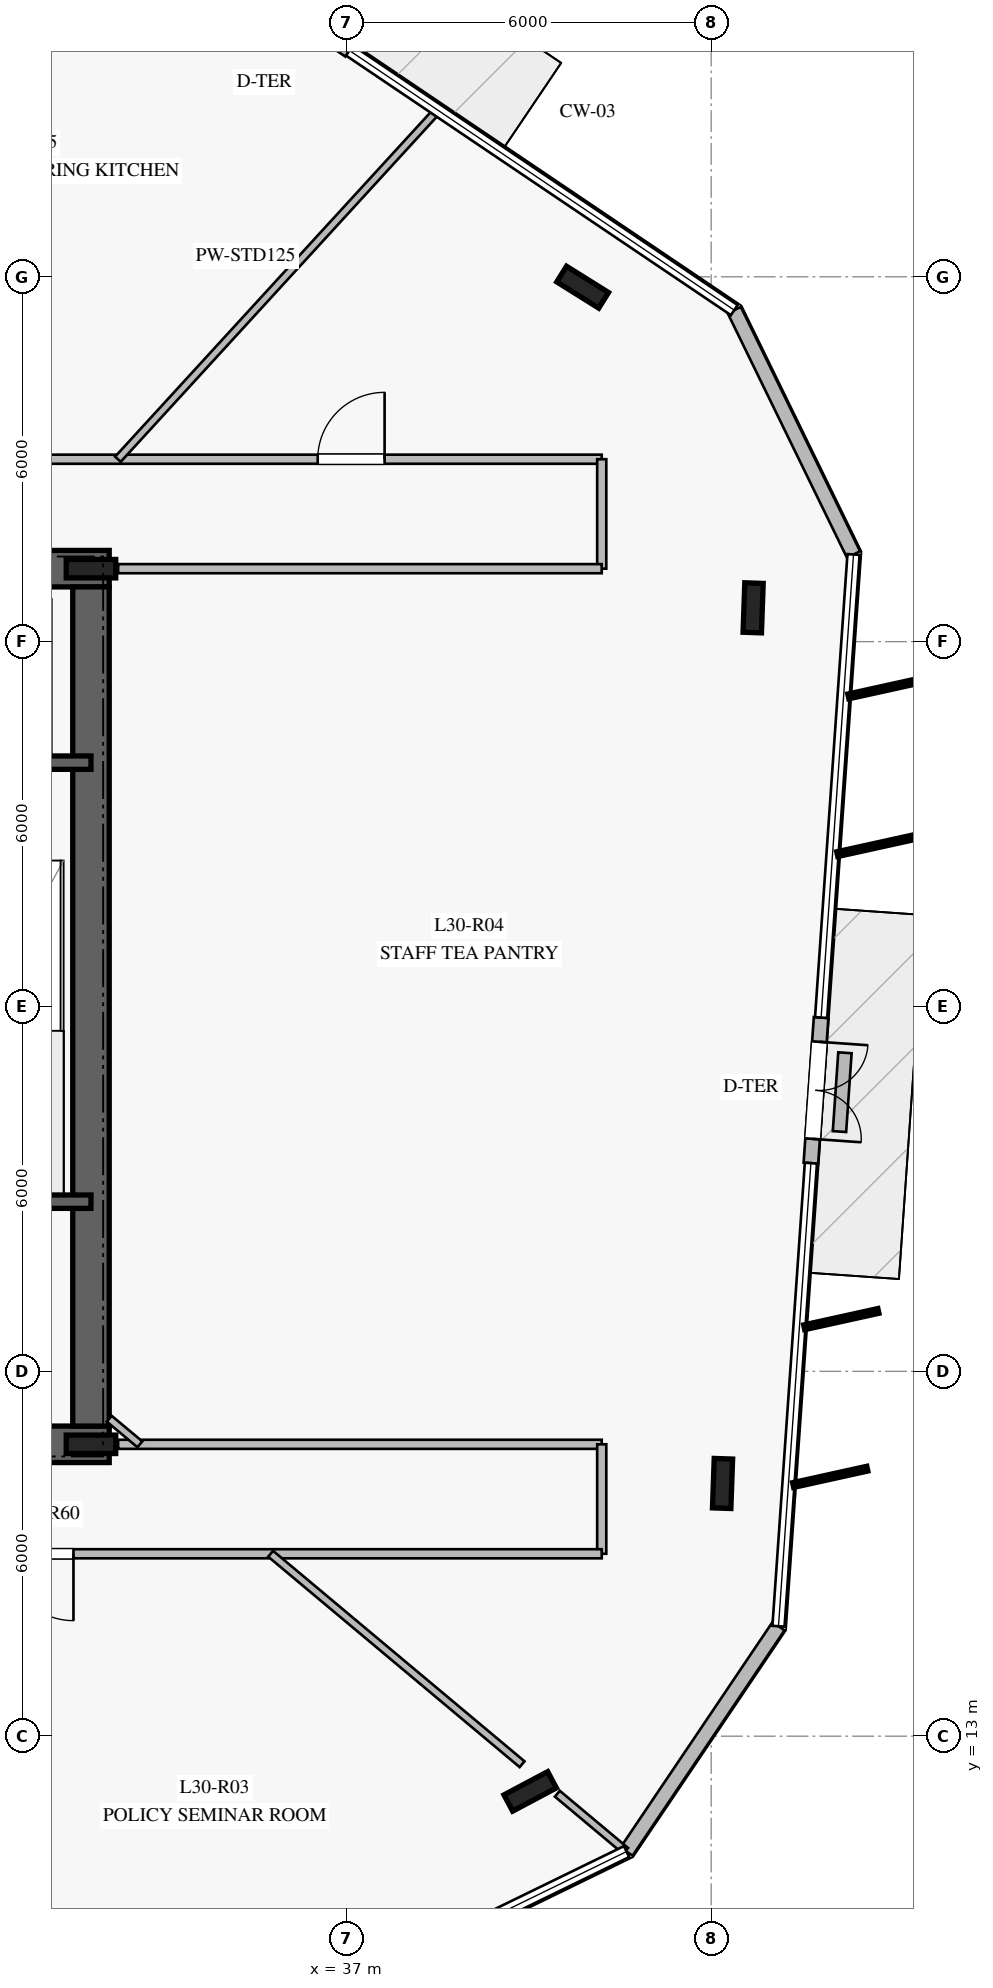
"""IFC4 building model, lengths in metres.
Left out: names, types, materials, properties, quantities, classifications, styles, units other than length and angle.
Written with IfcOpenShell. Run it as: python <this file> out.ifc"""

import sys

from ifc_helpers import new_model, si_unit, direction, frame, frame_2d, origin, origin_2d, place, context, subcontext, project, spatial, rectangle, i_section, extrude, element, fill, save


model = new_model("IFC4")
c1 = context("Model", 3, precision=1e-05, world=origin(), true_north=direction((0.0, 1.0)))
c2 = subcontext(c1, "Body", "Model", "MODEL_VIEW")
j1 = project(units=[si_unit("LENGTHUNIT", "METRE"), si_unit("PLANEANGLEUNIT", "RADIAN")], contexts=[c1])
p1 = place(None, origin())
s1 = spatial("IfcSite", under=j1, at=p1, CompositionType="ELEMENT")
p2 = place(p1, origin())
s2 = spatial("IfcBuilding", under=s1, at=p2, CompositionType="ELEMENT")
p3 = place(p2, frame((0.0, 0.0, 126.4)))
s3 = spatial("IfcBuildingStorey", under=s2, at=p3, CompositionType="ELEMENT", Elevation=126.4)
p4 = place(p3, frame((16.9, 17.8, 0.0), z_axis=(0.0, 0.0, 1.0), x_axis=(1.0, 0.0, 0.0)))
e1 = element("IfcWall", 1, at=p4, inside=s3, PredefinedType="SHEAR", context=c2, shape_type="SweptSolid", body=[
    extrude(rectangle(XDim=16.2, YDim=0.6, at=frame_2d((8.1, 0.0))), origin(), (0.0, 0.0, 1.0), 3.76),
])
p5 = place(p4, frame((5.05, 0.0, 0.0)))
e2 = element("IfcOpeningElement", 2, at=p5, cuts=e1, PredefinedType="OPENING", context=c2, shape_type="SweptSolid", body=[
    extrude(rectangle(XDim=1.2, YDim=2.25, at=frame_2d((0.6, 1.125))), frame((0.0, 0.31, 0.0), z_axis=(0.0, -1.0, 0.0), x_axis=(1.0, 0.0, 0.0)), (0.0, 0.0, 1.0), 0.62),
])
p6 = place(p4, frame((14.0, 0.0, 0.0)))
e3 = element("IfcOpeningElement", 3, at=p6, cuts=e1, PredefinedType="OPENING", context=c2, shape_type="SweptSolid", body=[
    extrude(rectangle(XDim=0.9, YDim=2.1, at=frame_2d((0.45, 1.05))), frame((0.0, 0.31, 0.0), z_axis=(0.0, -1.0, 0.0), x_axis=(1.0, 0.0, 0.0)), (0.0, 0.0, 1.0), 0.62),
])
p7 = place(p4, frame((9.25, 0.0, 0.0)))
e4 = element("IfcOpeningElement", 4, at=p7, cuts=e1, PredefinedType="OPENING", context=c2, shape_type="SweptSolid", body=[
    extrude(rectangle(XDim=1.1, YDim=2.2, at=frame_2d((0.55, 1.1))), frame((0.0, 0.31, 0.0), z_axis=(0.0, -1.0, 0.0), x_axis=(1.0, 0.0, 0.0)), (0.0, 0.0, 1.0), 0.62),
])
p8 = place(p3, frame((33.1, 32.2, 0.0), z_axis=(0.0, 0.0, 1.0), x_axis=(-1.0, 0.0, 0.0)))
e5 = element("IfcWall", 5, at=p8, inside=s3, PredefinedType="SHEAR", context=c2, shape_type="SweptSolid", body=[
    extrude(rectangle(XDim=16.2, YDim=0.6, at=frame_2d((8.1, 0.0))), origin(), (0.0, 0.0, 1.0), 3.76),
])
p9 = place(p8, frame((5.05, 0.0, 0.0)))
e6 = element("IfcOpeningElement", 6, at=p9, cuts=e5, PredefinedType="OPENING", context=c2, shape_type="SweptSolid", body=[
    extrude(rectangle(XDim=1.2, YDim=2.25, at=frame_2d((0.6, 1.125))), frame((0.0, 0.31, 0.0), z_axis=(0.0, -1.0, 0.0), x_axis=(1.0, 0.0, 0.0)), (0.0, 0.0, 1.0), 0.62),
])
p10 = place(p8, frame((11.85, 0.0, 0.0)))
e7 = element("IfcOpeningElement", 7, at=p10, cuts=e5, PredefinedType="OPENING", context=c2, shape_type="SweptSolid", body=[
    extrude(rectangle(XDim=1.1, YDim=2.2, at=frame_2d((0.55, 1.1))), frame((0.0, 0.31, 0.0), z_axis=(0.0, -1.0, 0.0), x_axis=(1.0, 0.0, 0.0)), (0.0, 0.0, 1.0), 0.62),
])
p11 = place(p8, frame((9.875, 0.0, 0.0)))
e8 = element("IfcOpeningElement", 8, at=p11, cuts=e5, PredefinedType="OPENING", context=c2, shape_type="SweptSolid", body=[
    extrude(rectangle(XDim=1.1, YDim=2.2, at=frame_2d((0.55, 1.1))), frame((0.0, 0.31, 0.0), z_axis=(0.0, -1.0, 0.0), x_axis=(1.0, 0.0, 0.0)), (0.0, 0.0, 1.0), 0.62),
])
p12 = place(p8, frame((7.9, 0.0, 0.0)))
e9 = element("IfcOpeningElement", 9, at=p12, cuts=e5, PredefinedType="OPENING", context=c2, shape_type="SweptSolid", body=[
    extrude(rectangle(XDim=1.1, YDim=2.2, at=frame_2d((0.55, 1.1))), frame((0.0, 0.31, 0.0), z_axis=(0.0, -1.0, 0.0), x_axis=(1.0, 0.0, 0.0)), (0.0, 0.0, 1.0), 0.62),
])
p13 = place(p3, frame((32.8, 18.1, 0.0), z_axis=(0.0, 0.0, 1.0), x_axis=(0.0, 1.0, 0.0)))
e10 = element("IfcWall", 10, at=p13, inside=s3, PredefinedType="SHEAR", context=c2, shape_type="SweptSolid", body=[
    extrude(rectangle(XDim=13.8, YDim=0.6, at=frame_2d((6.9, 0.0))), origin(), (0.0, 0.0, 1.0), 3.76),
])
for number, where, z_axis, x_axis in (
    (11, (32.8, 17.8, 0.0), (0.0, 0.0, 1.0), (1.0, 0.0, 0.0)),
    (12, (32.8, 32.2, 0.0), (0.0, 0.0, 1.0), (1.0, 0.0, 0.0)),
):
    element("IfcColumn", number, at=place(p3, frame(where, z_axis=z_axis, x_axis=x_axis)), inside=s3, PredefinedType="COLUMN", context=c2, shape_type="SweptSolid", body=[
        extrude(i_section(OverallWidth=0.303, OverallDepth=0.814, WebThickness=0.021, FlangeThickness=0.04, at=origin_2d()), origin(), (0.0, 0.0, 1.0), 4.0),
    ])
for number, where, z_axis, x_axis in (
    (13, (29.08, 21.79, 0.0), (0.0, 0.0, 1.0), (1.0, 0.0, 0.0)),
    (14, (29.08, 29.01, 0.0), (0.0, 0.0, 1.0), (1.0, 0.0, 0.0)),
):
    element("IfcWall", number, at=place(p3, frame(where, z_axis=z_axis, x_axis=x_axis)), inside=s3, PredefinedType="SOLIDWALL", context=c2, shape_type="SweptSolid", body=[
        extrude(rectangle(XDim=3.72, YDim=0.22, at=frame_2d((1.86, 0.0))), origin(), (0.0, 0.0, 1.0), 3.76),
    ])
for number, where, z_axis, x_axis in (
    (15, (40.886, 36.829, 0.0), (0.0, 0.0, 1.0), (-0.848, 0.53, 0.0)),
    (16, (40.023, 12.092, 0.0), (0.0, 0.0, 1.0), (0.883, 0.469, 0.0)),
    (17, (43.187, 17.156, 0.0), (0.0, 0.0, 1.0), (0.035, 0.999, 0.0)),
    (18, (43.69, 31.556, 0.0), (0.0, 0.0, 1.0), (0.035, 0.999, 0.0)),
):
    element("IfcColumn", number, at=place(p3, frame(where, z_axis=z_axis, x_axis=x_axis)), inside=s3, PredefinedType="COLUMN", context=c2, shape_type="SweptSolid", body=[
        extrude(i_section(OverallWidth=0.303, OverallDepth=0.814, WebThickness=0.021, FlangeThickness=0.04, at=origin_2d()), origin(), (0.0, 0.0, 1.0), 4.0),
    ])
p14 = place(p3, frame((37.051, 40.721, 0.0), z_axis=(0.0, 0.0, 1.0), x_axis=(-0.828953641959, 0.559317315558, 0.0)))
e19 = element("IfcWall", 19, at=p14, inside=s3, PredefinedType="STANDARD", context=c2, shape_type="SweptSolid", body=[
    extrude(rectangle(XDim=2.399, YDim=0.24, at=frame_2d((1.2, 0.0))), origin(), (0.0, 0.0, 1.0), 3.76),
])
p15 = place(p14, frame((0.4, 0.0, 0.0)))
e20 = element("IfcOpeningElement", 20, at=p15, cuts=e19, PredefinedType="OPENING", context=c2, shape_type="SweptSolid", body=[
    extrude(rectangle(XDim=1.6, YDim=2.25, at=frame_2d((0.8, 1.125))), frame((0.0, 0.13, 0.0), z_axis=(0.0, -1.0, 0.0), x_axis=(1.0, 0.0, 0.0)), (0.0, 0.0, 1.0), 0.26),
])
p16 = place(p3, frame((41.608, 11.102, 0.0), z_axis=(0.0, 0.0, 1.0), x_axis=(0.559078804203, 0.82911452206, 0.0)))
e21 = element("IfcWall", 21, at=p16, inside=s3, PredefinedType="STANDARD", context=c2, shape_type="SweptSolid", body=[
    extrude(rectangle(XDim=4.47, YDim=0.24, at=frame_2d((2.235, 0.0))), origin(), (0.0, 0.0, 1.0), 3.76),
])
p17 = place(p3, frame((44.64, 22.424, 0.0), z_axis=(0.0, 0.0, 1.0), x_axis=(0.070090302694, 0.997540650534, 0.0)))
e22 = element("IfcWall", 22, at=p17, inside=s3, PredefinedType="STANDARD", context=c2, shape_type="SweptSolid", body=[
    extrude(rectangle(XDim=2.4, YDim=0.24, at=frame_2d((1.2, 0.0))), origin(), (0.0, 0.0, 1.0), 3.76),
])
p18 = place(p17, frame((0.4, 0.0, 0.0)))
e23 = element("IfcOpeningElement", 23, at=p18, cuts=e22, PredefinedType="OPENING", context=c2, shape_type="SweptSolid", body=[
    extrude(rectangle(XDim=1.6, YDim=2.25, at=frame_2d((0.8, 1.125))), frame((0.0, 0.13, 0.0), z_axis=(0.0, -1.0, 0.0), x_axis=(1.0, 0.0, 0.0)), (0.0, 0.0, 1.0), 0.26),
])
p19 = place(p3, frame((45.341, 32.433, 0.0), z_axis=(0.0, 0.0, 1.0), x_axis=(-0.438566687479, 0.898698648399, 0.0)))
e24 = element("IfcWall", 24, at=p19, inside=s3, PredefinedType="STANDARD", context=c2, shape_type="SweptSolid", body=[
    extrude(rectangle(XDim=4.472, YDim=0.24, at=frame_2d((2.236, 0.0))), origin(), (0.0, 0.0, 1.0), 3.76),
])
p20 = place(p3, frame((45.11, 22.943, 0.0), z_axis=(0.0, 0.0, 1.0), x_axis=(0.069163294949, 0.997605352147, 0.0)))
e25 = element("IfcWall", 25, at=p20, inside=s3, PredefinedType="USERDEFINED", context=c2, shape_type="SweptSolid", body=[
    extrude(rectangle(XDim=1.299, YDim=0.22, at=frame_2d((0.649, 0.0))), origin(), (0.0, 0.0, 1.0), 0.4),
])
p21 = place(p3, frame((25.95, 34.0, 0.0), z_axis=(0.0, 0.0, 1.0), x_axis=(1.0, 0.0, 0.0)))
e26 = element("IfcWall", 26, at=p21, inside=s3, PredefinedType="PARTITIONING", context=c2, shape_type="SweptSolid", body=[
    extrude(rectangle(XDim=15.25, YDim=0.15, at=frame_2d((7.625, 0.0))), origin(), (0.0, 0.0, 1.0), 3.21),
])
p22 = place(p21, frame((10.579, 0.0, 0.0)))
e27 = element("IfcOpeningElement", 27, at=p22, cuts=e26, PredefinedType="OPENING", context=c2, shape_type="SweptSolid", body=[
    extrude(rectangle(XDim=1.1, YDim=2.2, at=frame_2d((0.55, 1.1))), frame((0.0, 0.085, 0.0), z_axis=(0.0, -1.0, 0.0), x_axis=(1.0, 0.0, 0.0)), (0.0, 0.0, 1.0), 0.17),
])
p23 = place(p3, frame((41.2, 34.0, 0.0), z_axis=(0.0, 0.0, 1.0), x_axis=(0.0, -1.0, 0.0)))
e28 = element("IfcWall", 28, at=p23, inside=s3, PredefinedType="PARTITIONING", context=c2, shape_type="SweptSolid", body=[
    extrude(rectangle(XDim=1.8, YDim=0.15, at=frame_2d((0.9, 0.0))), origin(), (0.0, 0.0, 1.0), 3.76),
])
for number, where, z_axis, x_axis in (
    (29, (41.2, 32.2, 0.0), (0.0, 0.0, 1.0), (-1.0, 0.0, 0.0)),
    (30, (33.247, 17.8, 0.0), (0.0, 0.0, 1.0), (1.0, 0.0, 0.0)),
):
    element("IfcWall", number, at=place(p3, frame(where, z_axis=z_axis, x_axis=x_axis)), inside=s3, PredefinedType="PARTITIONING", context=c2, shape_type="SweptSolid", body=[
        extrude(rectangle(XDim=7.953, YDim=0.15, at=frame_2d((3.977, 0.0))), origin(), (0.0, 0.0, 1.0), 3.21),
    ])
p24 = place(p3, frame((41.2, 17.8, 0.0), z_axis=(0.0, 0.0, 1.0), x_axis=(0.0, -1.0, 0.0)))
e31 = element("IfcWall", 31, at=p24, inside=s3, PredefinedType="PARTITIONING", context=c2, shape_type="SweptSolid", body=[
    extrude(rectangle(XDim=1.8, YDim=0.15, at=frame_2d((0.9, 0.0))), origin(), (0.0, 0.0, 1.0), 3.21),
])
p25 = place(p3, frame((41.2, 16.0, 0.0), z_axis=(0.0, 0.0, 1.0), x_axis=(-1.0, 0.0, 0.0)))
e32 = element("IfcWall", 32, at=p25, inside=s3, PredefinedType="PARTITIONING", context=c2, shape_type="SweptSolid", body=[
    extrude(rectangle(XDim=15.25, YDim=0.15, at=frame_2d((7.625, 0.0))), origin(), (0.0, 0.0, 1.0), 3.21),
])
p26 = place(p25, frame((13.648, 0.0, 0.0)))
e33 = element("IfcOpeningElement", 33, at=p26, cuts=e32, PredefinedType="OPENING", context=c2, shape_type="SweptSolid", body=[
    extrude(rectangle(XDim=1.1, YDim=2.2, at=frame_2d((0.55, 1.1))), frame((0.0, 0.085, 0.0), z_axis=(0.0, -1.0, 0.0), x_axis=(1.0, 0.0, 0.0)), (0.0, 0.0, 1.0), 0.17),
])
p27 = place(p25, frame((8.688, 0.0, 0.0)))
e34 = element("IfcOpeningElement", 34, at=p27, cuts=e32, PredefinedType="OPENING", context=c2, shape_type="SweptSolid", body=[
    extrude(rectangle(XDim=1.1, YDim=2.2, at=frame_2d((0.55, 1.1))), frame((0.0, 0.085, 0.0), z_axis=(0.0, -1.0, 0.0), x_axis=(1.0, 0.0, 0.0)), (0.0, 0.0, 1.0), 0.17),
])
p28 = place(p3, frame((33.243, 34.0, 0.0), z_axis=(0.0, 0.0, 1.0), x_axis=(0.675476997876, 0.737381058436, 0.0)))
e35 = element("IfcWall", 35, at=p28, inside=s3, PredefinedType="PARTITIONING", context=c2, shape_type="SweptSolid", body=[
    extrude(rectangle(XDim=7.769, YDim=0.125, at=frame_2d((3.885, 0.0))), origin(), (0.0, 0.0, 1.0), 3.05),
])
p29 = place(p3, frame((33.1, 18.221, 0.0), z_axis=(0.0, 0.0, 1.0), x_axis=(0.76748927859, -0.641061781148, 0.0)))
e36 = element("IfcWall", 36, at=p29, inside=s3, PredefinedType="PARTITIONING", context=c2, shape_type="SweptSolid", body=[
    extrude(rectangle(XDim=0.656, YDim=0.125, at=frame_2d((0.328, 0.0))), origin(), (0.0, 0.0, 1.0), 3.21),
])
p30 = place(p3, frame((35.755, 16.0, 0.0), z_axis=(0.0, 0.0, 1.0), x_axis=(0.766842661683, -0.641835128536, 0.0)))
e37 = element("IfcWall", 37, at=p30, inside=s3, PredefinedType="PARTITIONING", context=c2, shape_type="SweptSolid", body=[
    extrude(rectangle(XDim=5.392, YDim=0.125, at=frame_2d((2.696, 0.0))), origin(), (0.0, 0.0, 1.0), 3.36),
])
p31 = place(p3, frame((40.47, 12.054, 0.0), z_axis=(0.0, 0.0, 1.0), x_axis=(0.766853077224, -0.641822684199, 0.0)))
e38 = element("IfcWall", 38, at=p31, inside=s3, PredefinedType="PARTITIONING", context=c2, shape_type="SweptSolid", body=[
    extrude(rectangle(XDim=1.465, YDim=0.125, at=frame_2d((0.732, 0.0))), origin(), (0.0, 0.0, 1.0), 3.76),
])
p32 = place(p18, frame((1.6, 0.0, 0.0), z_axis=(0.0, 0.0, 1.0), x_axis=(-1.0, 0.0, 0.0)))
e39 = element("IfcDoor", 39, at=p32, inside=s3, OperationType="DOUBLE_DOOR_SINGLE_SWING", PredefinedType="DOOR", context=c2, shape_type="SweptSolid", body=[
    extrude(rectangle(XDim=1.6, YDim=2.25, at=frame_2d((0.8, 1.125))), frame((0.0, 0.025, 0.0), z_axis=(0.0, -1.0, 0.0), x_axis=(1.0, 0.0, 0.0)), (0.0, 0.0, 1.0), 0.05),
])
fill(e23, e39)
p33 = place(p27, origin())
e40 = element("IfcDoor", 40, at=p33, inside=s3, OperationType="SINGLE_SWING_LEFT", PredefinedType="DOOR", context=c2, shape_type="SweptSolid", body=[
    extrude(rectangle(XDim=1.1, YDim=2.2, at=frame_2d((0.55, 1.1))), frame((0.0, 0.025, 0.0), z_axis=(0.0, -1.0, 0.0), x_axis=(1.0, 0.0, 0.0)), (0.0, 0.0, 1.0), 0.05),
])
fill(e34, e40)
p34 = place(p22, origin())
e41 = element("IfcDoor", 41, at=p34, inside=s3, OperationType="SINGLE_SWING_RIGHT", PredefinedType="DOOR", context=c2, shape_type="SweptSolid", body=[
    extrude(rectangle(XDim=1.1, YDim=2.2, at=frame_2d((0.55, 1.1))), frame((0.0, 0.025, 0.0), z_axis=(0.0, -1.0, 0.0), x_axis=(1.0, 0.0, 0.0)), (0.0, 0.0, 1.0), 0.05),
])
fill(e27, e41)
save(model, sys.argv[1])
